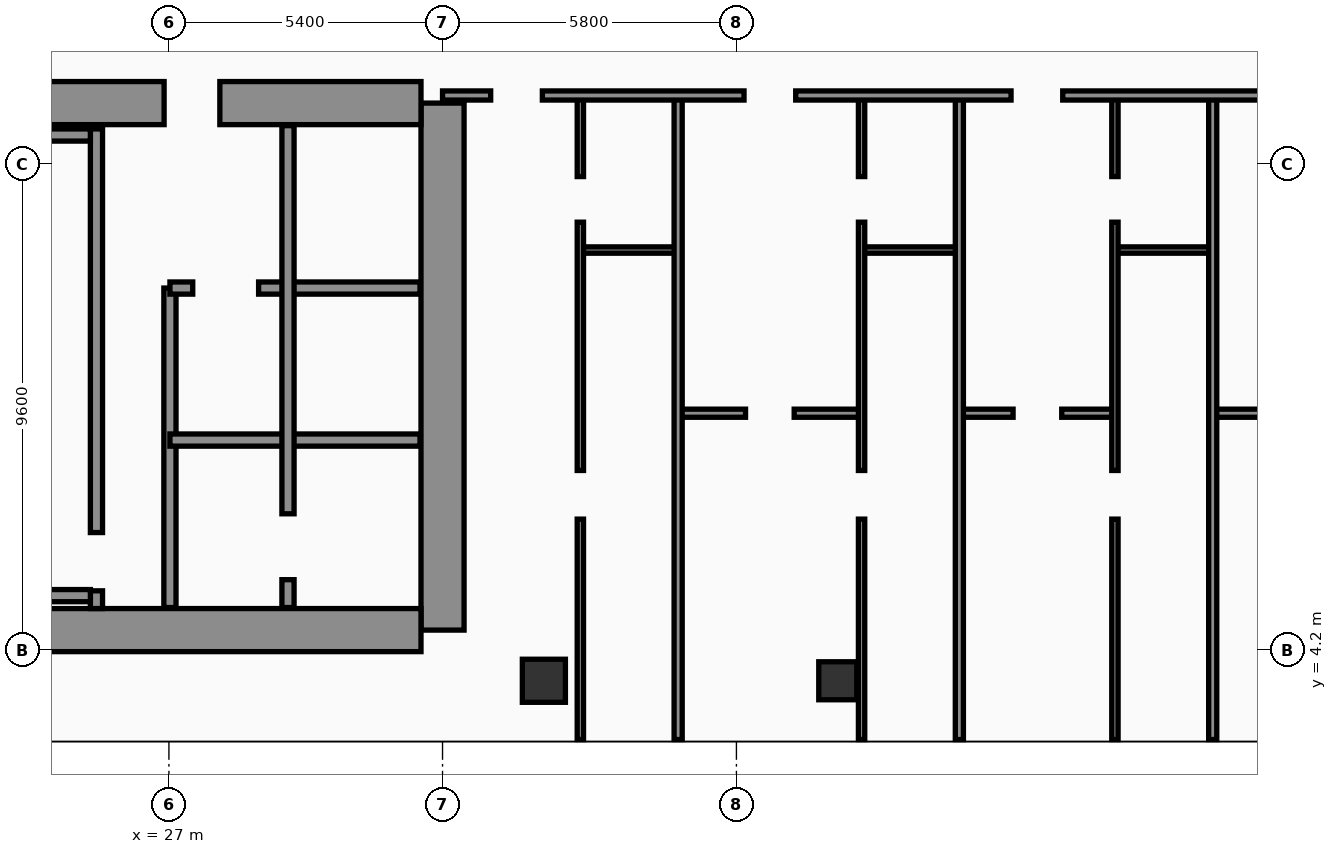
"""IFC4 building model, lengths in metres.
Left out: names, types, materials, properties, quantities, classifications, styles, units other than length and angle.
Written with IfcOpenShell. Run it as: python <this file> out.ifc"""

import sys

from ifc_helpers import new_model, si_unit, direction, frame, frame_2d, origin, origin_2d, place, context, subcontext, project, spatial, rectangle, hollow_rectangle, extrude, element, fill, save


model = new_model("IFC4")
c1 = context("Model", 3, precision=1e-05, world=origin(), true_north=direction((0.0, 1.0)))
c2 = subcontext(c1, "Body", "Model", "MODEL_VIEW")
j1 = project(units=[si_unit("LENGTHUNIT", "METRE"), si_unit("PLANEANGLEUNIT", "RADIAN")], contexts=[c1])
p1 = place(None, origin())
s1 = spatial("IfcSite", under=j1, at=p1, CompositionType="ELEMENT")
p2 = place(p1, origin())
s2 = spatial("IfcBuilding", under=s1, at=p2, CompositionType="ELEMENT")
p3 = place(p2, frame((0.0, 0.0, 171.3)))
s3 = spatial("IfcBuildingStorey", under=s2, at=p3, CompositionType="ELEMENT", Elevation=171.3)
p4 = place(p3, frame((32.4, 4.6, 0.0), z_axis=(0.0, 0.0, 1.0), x_axis=(0.0, 1.0, 0.0)))
e1 = element("IfcWall", 1, at=p4, inside=s3, PredefinedType="SHEAR", context=c2, shape_type="SweptSolid", body=[
    extrude(rectangle(XDim=10.4, YDim=0.85, at=frame_2d((5.2, 0.0))), origin(), (0.0, 0.0, 1.0), 3.56),
])
p5 = place(p3, frame((22.025, 15.0, 0.0), z_axis=(0.0, 0.0, 1.0), x_axis=(1.0, 0.0, 0.0)))
e2 = element("IfcWall", 2, at=p5, inside=s3, PredefinedType="SHEAR", context=c2, shape_type="SweptSolid", body=[
    extrude(rectangle(XDim=9.95, YDim=0.85, at=frame_2d((4.975, 0.0))), origin(), (0.0, 0.0, 1.0), 3.56),
])
p6 = place(p5, frame((4.88, 0.0, 0.0)))
e3 = element("IfcOpeningElement", 3, at=p6, cuts=e2, PredefinedType="OPENING", context=c2, shape_type="SweptSolid", body=[
    extrude(rectangle(XDim=1.1, YDim=2.2, at=frame_2d((0.55, 1.1))), frame((0.0, 0.435, 0.0), z_axis=(0.0, -1.0, 0.0), x_axis=(1.0, 0.0, 0.0)), (0.0, 0.0, 1.0), 0.87),
])
p7 = place(p3, frame((22.025, 4.6, 0.0), z_axis=(0.0, 0.0, 1.0), x_axis=(1.0, 0.0, 0.0)))
e4 = element("IfcWall", 4, at=p7, inside=s3, PredefinedType="SHEAR", context=c2, shape_type="SweptSolid", body=[
    extrude(rectangle(XDim=9.95, YDim=0.85, at=frame_2d((4.975, 0.0))), origin(), (0.0, 0.0, 1.0), 3.56),
])
p8 = place(p3, frame((25.57, 5.025, 0.0), z_axis=(0.0, 0.0, 1.0), x_axis=(0.0, 1.0, 0.0)))
e5 = element("IfcWall", 5, at=p8, inside=s3, PredefinedType="SOLIDWALL", context=c2, shape_type="SweptSolid", body=[
    extrude(rectangle(XDim=9.465, YDim=0.24, at=frame_2d((4.732, 0.0))), origin(), (0.0, 0.0, 1.0), 3.56),
])
p9 = place(p8, frame((0.35, 0.0, 0.0)))
e6 = element("IfcOpeningElement", 6, at=p9, cuts=e5, PredefinedType="OPENING", context=c2, shape_type="SweptSolid", body=[
    extrude(rectangle(XDim=1.15, YDim=2.2, at=frame_2d((0.575, 1.1))), frame((0.0, 0.13, 0.0), z_axis=(0.0, -1.0, 0.0), x_axis=(1.0, 0.0, 0.0)), (0.0, 0.0, 1.0), 0.26),
])
for number, where, z_axis, x_axis in (
    (7, (22.35, 5.28, 0.0), (0.0, 0.0, 1.0), (1.0, 0.0, 0.0)),
    (8, (22.35, 14.37, 0.0), (0.0, 0.0, 1.0), (1.0, 0.0, 0.0)),
):
    element("IfcWall", number, at=place(p3, frame(where, z_axis=z_axis, x_axis=x_axis)), inside=s3, PredefinedType="SOLIDWALL", context=c2, shape_type="SweptSolid", body=[
        extrude(rectangle(XDim=3.1, YDim=0.24, at=frame_2d((1.55, 0.0))), origin(), (0.0, 0.0, 1.0), 3.56),
    ])
p10 = place(p3, frame((34.4, 3.6, 0.0), z_axis=(0.0, 0.0, 1.0), x_axis=(1.0, 0.0, 0.0)))
e9 = element("IfcColumn", 9, at=p10, inside=s3, PredefinedType="COLUMN", context=c2, shape_type="SweptSolid", body=[
    extrude(hollow_rectangle(XDim=0.85, YDim=0.85, WallThickness=0.036, at=origin_2d()), origin(), (0.0, 0.0, 1.0), 3.56),
])
p11 = place(p3, frame((40.2, 3.6, 0.0), z_axis=(0.0, 0.0, 1.0), x_axis=(1.0, 0.0, 0.0)))
e10 = element("IfcColumn", 10, at=p11, inside=s3, PredefinedType="COLUMN", context=c2, shape_type="SweptSolid", body=[
    extrude(hollow_rectangle(XDim=0.75, YDim=0.75, WallThickness=0.032, at=origin_2d()), origin(), (0.0, 0.0, 1.0), 3.56),
])
p12 = place(p3, frame((27.02, 5.045, 0.0), z_axis=(0.0, 0.0, 1.0), x_axis=(0.0, 1.0, 0.0)))
e11 = element("IfcWall", 11, at=p12, inside=s3, PredefinedType="SOLIDWALL", context=c2, shape_type="SweptSolid", body=[
    extrude(rectangle(XDim=6.305, YDim=0.24, at=frame_2d((3.153, 0.0))), origin(), (0.0, 0.0, 1.0), 3.56),
])
p13 = place(p3, frame((27.02, 11.35, 0.0), z_axis=(0.0, 0.0, 1.0), x_axis=(1.0, 0.0, 0.0)))
e12 = element("IfcWall", 12, at=p13, inside=s3, PredefinedType="SOLIDWALL", context=c2, shape_type="SweptSolid", body=[
    extrude(rectangle(XDim=4.935, YDim=0.24, at=frame_2d((2.468, 0.0))), origin(), (0.0, 0.0, 1.0), 3.56),
])
p14 = place(p13, frame((0.45, 0.0, 0.0)))
e13 = element("IfcOpeningElement", 13, at=p14, cuts=e12, PredefinedType="OPENING", context=c2, shape_type="SweptSolid", body=[
    extrude(rectangle(XDim=1.3, YDim=2.35, at=frame_2d((0.65, 1.175))), frame((0.0, 0.13, 0.0), z_axis=(0.0, -1.0, 0.0), x_axis=(1.0, 0.0, 0.0)), (0.0, 0.0, 1.0), 0.26),
])
p15 = place(p3, frame((27.02, 8.35, 0.0), z_axis=(0.0, 0.0, 1.0), x_axis=(1.0, 0.0, 0.0)))
e14 = element("IfcWall", 14, at=p15, inside=s3, PredefinedType="SOLIDWALL", context=c2, shape_type="SweptSolid", body=[
    extrude(rectangle(XDim=4.935, YDim=0.24, at=frame_2d((2.468, 0.0))), origin(), (0.0, 0.0, 1.0), 3.56),
])
p16 = place(p3, frame((29.35, 5.045, 0.0), z_axis=(0.0, 0.0, 1.0), x_axis=(0.0, 1.0, 0.0)))
e15 = element("IfcWall", 15, at=p16, inside=s3, PredefinedType="SOLIDWALL", context=c2, shape_type="SweptSolid", body=[
    extrude(rectangle(XDim=9.51, YDim=0.24, at=frame_2d((4.755, 0.0))), origin(), (0.0, 0.0, 1.0), 3.56),
])
p17 = place(p16, frame((0.55, 0.0, 0.0)))
e16 = element("IfcOpeningElement", 16, at=p17, cuts=e15, PredefinedType="OPENING", context=c2, shape_type="SweptSolid", body=[
    extrude(rectangle(XDim=1.3, YDim=2.35, at=frame_2d((0.65, 1.175))), frame((0.0, 0.13, 0.0), z_axis=(0.0, -1.0, 0.0), x_axis=(1.0, 0.0, 0.0)), (0.0, 0.0, 1.0), 0.26),
])
p18 = place(p3, frame((35.12, 12.1, 0.0), z_axis=(0.0, 0.0, 1.0), x_axis=(1.0, 0.0, 0.0)))
e17 = element("IfcWall", 17, at=p18, inside=s3, PredefinedType="PARTITIONING", context=c2, shape_type="SweptSolid", body=[
    extrude(rectangle(XDim=1.93, YDim=0.125, at=frame_2d((0.965, 0.0))), origin(), (0.0, 0.0, 1.0), 3.56),
])
p19 = place(p3, frame((35.12, 2.44, 0.0), z_axis=(0.0, 0.0, 1.0), x_axis=(0.0, 1.0, 0.0)))
e18 = element("IfcWall", 18, at=p19, inside=s3, PredefinedType="PARTITIONING", context=c2, shape_type="SweptSolid", body=[
    extrude(rectangle(XDim=12.71, YDim=0.125, at=frame_2d((6.355, 0.0))), origin(), (0.0, 0.0, 1.0), 2.94),
])
p20 = place(p19, frame((4.35, 0.0, 0.0)))
e19 = element("IfcOpeningElement", 19, at=p20, cuts=e18, PredefinedType="OPENING", context=c2, shape_type="SweptSolid", body=[
    extrude(rectangle(XDim=0.96, YDim=2.2, at=frame_2d((0.48, 1.1))), frame((0.0, 0.073, 0.0), z_axis=(0.0, -1.0, 0.0), x_axis=(1.0, 0.0, 0.0)), (0.0, 0.0, 1.0), 0.145),
])
p21 = place(p19, frame((10.21, 0.0, 0.0)))
e20 = element("IfcOpeningElement", 20, at=p21, cuts=e18, PredefinedType="OPENING", context=c2, shape_type="SweptSolid", body=[
    extrude(rectangle(XDim=0.9, YDim=2.15, at=frame_2d((0.45, 1.075))), frame((0.0, 0.073, 0.0), z_axis=(0.0, -1.0, 0.0), x_axis=(1.0, 0.0, 0.0)), (0.0, 0.0, 1.0), 0.145),
])
p22 = place(p3, frame((40.67, 12.1, 0.0), z_axis=(0.0, 0.0, 1.0), x_axis=(1.0, 0.0, 0.0)))
e21 = element("IfcWall", 21, at=p22, inside=s3, PredefinedType="PARTITIONING", context=c2, shape_type="SweptSolid", body=[
    extrude(rectangle(XDim=1.93, YDim=0.125, at=frame_2d((0.965, 0.0))), origin(), (0.0, 0.0, 1.0), 3.56),
])
p23 = place(p3, frame((37.05, 8.88, 0.0), z_axis=(0.0, 0.0, 1.0), x_axis=(1.0, 0.0, 0.0)))
e22 = element("IfcWall", 22, at=p23, inside=s3, PredefinedType="PARTITIONING", context=c2, shape_type="SweptSolid", body=[
    extrude(rectangle(XDim=3.62, YDim=0.16, at=frame_2d((1.81, 0.0))), origin(), (0.0, 0.0, 1.0), 2.94),
])
p24 = place(p23, frame((1.33, 0.0, 0.0)))
e23 = element("IfcOpeningElement", 23, at=p24, cuts=e22, PredefinedType="OPENING", context=c2, shape_type="SweptSolid", body=[
    extrude(rectangle(XDim=0.96, YDim=2.2, at=frame_2d((0.48, 1.1))), frame((0.0, 0.09, 0.0), z_axis=(0.0, -1.0, 0.0), x_axis=(1.0, 0.0, 0.0)), (0.0, 0.0, 1.0), 0.18),
])
p25 = place(p3, frame((40.67, 2.44, 0.0), z_axis=(0.0, 0.0, 1.0), x_axis=(0.0, 1.0, 0.0)))
e24 = element("IfcWall", 24, at=p25, inside=s3, PredefinedType="PARTITIONING", context=c2, shape_type="SweptSolid", body=[
    extrude(rectangle(XDim=12.71, YDim=0.125, at=frame_2d((6.355, 0.0))), origin(), (0.0, 0.0, 1.0), 2.94),
])
p26 = place(p25, frame((4.35, 0.0, 0.0)))
e25 = element("IfcOpeningElement", 25, at=p26, cuts=e24, PredefinedType="OPENING", context=c2, shape_type="SweptSolid", body=[
    extrude(rectangle(XDim=0.96, YDim=2.2, at=frame_2d((0.48, 1.1))), frame((0.0, 0.073, 0.0), z_axis=(0.0, -1.0, 0.0), x_axis=(1.0, 0.0, 0.0)), (0.0, 0.0, 1.0), 0.145),
])
p27 = place(p25, frame((10.21, 0.0, 0.0)))
e26 = element("IfcOpeningElement", 26, at=p27, cuts=e24, PredefinedType="OPENING", context=c2, shape_type="SweptSolid", body=[
    extrude(rectangle(XDim=0.9, YDim=2.15, at=frame_2d((0.45, 1.075))), frame((0.0, 0.073, 0.0), z_axis=(0.0, -1.0, 0.0), x_axis=(1.0, 0.0, 0.0)), (0.0, 0.0, 1.0), 0.145),
])
p28 = place(p3, frame((37.05, 2.44, 0.0), z_axis=(0.0, 0.0, 1.0), x_axis=(0.0, 1.0, 0.0)))
e27 = element("IfcWall", 27, at=p28, inside=s3, PredefinedType="PARTITIONING", context=c2, shape_type="SweptSolid", body=[
    extrude(rectangle(XDim=12.71, YDim=0.16, at=frame_2d((6.355, 0.0))), origin(), (0.0, 0.0, 1.0), 2.94),
])
p29 = place(p3, frame((45.67, 12.1, 0.0), z_axis=(0.0, 0.0, 1.0), x_axis=(1.0, 0.0, 0.0)))
e28 = element("IfcWall", 28, at=p29, inside=s3, PredefinedType="PARTITIONING", context=c2, shape_type="SweptSolid", body=[
    extrude(rectangle(XDim=1.93, YDim=0.125, at=frame_2d((0.965, 0.0))), origin(), (0.0, 0.0, 1.0), 2.94),
])
p30 = place(p3, frame((42.6, 8.88, 0.0), z_axis=(0.0, 0.0, 1.0), x_axis=(1.0, 0.0, 0.0)))
e29 = element("IfcWall", 29, at=p30, inside=s3, PredefinedType="PARTITIONING", context=c2, shape_type="SweptSolid", body=[
    extrude(rectangle(XDim=3.07, YDim=0.16, at=frame_2d((1.535, 0.0))), origin(), (0.0, 0.0, 1.0), 3.56),
])
p31 = place(p30, frame((1.06, 0.0, 0.0)))
e30 = element("IfcOpeningElement", 30, at=p31, cuts=e29, PredefinedType="OPENING", context=c2, shape_type="SweptSolid", body=[
    extrude(rectangle(XDim=0.96, YDim=2.2, at=frame_2d((0.48, 1.1))), frame((0.0, 0.09, 0.0), z_axis=(0.0, -1.0, 0.0), x_axis=(1.0, 0.0, 0.0)), (0.0, 0.0, 1.0), 0.18),
])
p32 = place(p3, frame((45.67, 2.44, 0.0), z_axis=(0.0, 0.0, 1.0), x_axis=(0.0, 1.0, 0.0)))
e31 = element("IfcWall", 31, at=p32, inside=s3, PredefinedType="PARTITIONING", context=c2, shape_type="SweptSolid", body=[
    extrude(rectangle(XDim=12.71, YDim=0.125, at=frame_2d((6.355, 0.0))), origin(), (0.0, 0.0, 1.0), 3.04),
])
p33 = place(p32, frame((4.35, 0.0, 0.0)))
e32 = element("IfcOpeningElement", 32, at=p33, cuts=e31, PredefinedType="OPENING", context=c2, shape_type="SweptSolid", body=[
    extrude(rectangle(XDim=0.96, YDim=2.2, at=frame_2d((0.48, 1.1))), frame((0.0, 0.073, 0.0), z_axis=(0.0, -1.0, 0.0), x_axis=(1.0, 0.0, 0.0)), (0.0, 0.0, 1.0), 0.145),
])
p34 = place(p32, frame((10.21, 0.0, 0.0)))
e33 = element("IfcOpeningElement", 33, at=p34, cuts=e31, PredefinedType="OPENING", context=c2, shape_type="SweptSolid", body=[
    extrude(rectangle(XDim=0.9, YDim=2.15, at=frame_2d((0.45, 1.075))), frame((0.0, 0.073, 0.0), z_axis=(0.0, -1.0, 0.0), x_axis=(1.0, 0.0, 0.0)), (0.0, 0.0, 1.0), 0.145),
])
p35 = place(p3, frame((42.6, 2.44, 0.0), z_axis=(0.0, 0.0, 1.0), x_axis=(0.0, 1.0, 0.0)))
e34 = element("IfcWall", 34, at=p35, inside=s3, PredefinedType="PARTITIONING", context=c2, shape_type="SweptSolid", body=[
    extrude(rectangle(XDim=12.71, YDim=0.16, at=frame_2d((6.355, 0.0))), origin(), (0.0, 0.0, 1.0), 3.04),
])
p36 = place(p3, frame((47.6, 8.88, 0.0), z_axis=(0.0, 0.0, 1.0), x_axis=(1.0, 0.0, 0.0)))
e35 = element("IfcWall", 35, at=p36, inside=s3, PredefinedType="PARTITIONING", context=c2, shape_type="SweptSolid", body=[
    extrude(rectangle(XDim=3.07, YDim=0.16, at=frame_2d((1.535, 0.0))), origin(), (0.0, 0.0, 1.0), 2.94),
])
p37 = place(p36, frame((1.06, 0.0, 0.0)))
e36 = element("IfcOpeningElement", 36, at=p37, cuts=e35, PredefinedType="OPENING", context=c2, shape_type="SweptSolid", body=[
    extrude(rectangle(XDim=0.96, YDim=2.2, at=frame_2d((0.48, 1.1))), frame((0.0, 0.09, 0.0), z_axis=(0.0, -1.0, 0.0), x_axis=(1.0, 0.0, 0.0)), (0.0, 0.0, 1.0), 0.18),
])
p38 = place(p3, frame((47.6, 2.44, 0.0), z_axis=(0.0, 0.0, 1.0), x_axis=(0.0, 1.0, 0.0)))
e37 = element("IfcWall", 37, at=p38, inside=s3, PredefinedType="PARTITIONING", context=c2, shape_type="SweptSolid", body=[
    extrude(rectangle(XDim=12.71, YDim=0.16, at=frame_2d((6.355, 0.0))), origin(), (0.0, 0.0, 1.0), 2.94),
])
p39 = place(p3, frame((32.4, 15.15, 0.0), z_axis=(0.0, 0.0, 1.0), x_axis=(1.0, 0.0, 0.0)))
e38 = element("IfcWall", 38, at=p39, inside=s3, PredefinedType="PARTITIONING", context=c2, shape_type="SweptSolid", body=[
    extrude(rectangle(XDim=20.2, YDim=0.18, at=frame_2d((10.1, 0.0))), origin(), (0.0, 0.0, 1.0), 2.94),
])
p40 = place(p39, frame((0.95, 0.0, 0.0)))
e39 = element("IfcOpeningElement", 39, at=p40, cuts=e38, PredefinedType="OPENING", context=c2, shape_type="SweptSolid", body=[
    extrude(rectangle(XDim=1.02, YDim=2.2, at=frame_2d((0.51, 1.1))), frame((0.0, 0.1, 0.0), z_axis=(0.0, -1.0, 0.0), x_axis=(1.0, 0.0, 0.0)), (0.0, 0.0, 1.0), 0.2),
])
p41 = place(p39, frame((5.95, 0.0, 0.0)))
e40 = element("IfcOpeningElement", 40, at=p41, cuts=e38, PredefinedType="OPENING", context=c2, shape_type="SweptSolid", body=[
    extrude(rectangle(XDim=1.02, YDim=2.2, at=frame_2d((0.51, 1.1))), frame((0.0, 0.1, 0.0), z_axis=(0.0, -1.0, 0.0), x_axis=(1.0, 0.0, 0.0)), (0.0, 0.0, 1.0), 0.2),
])
p42 = place(p39, frame((11.22, 0.0, 0.0)))
e41 = element("IfcOpeningElement", 41, at=p42, cuts=e38, PredefinedType="OPENING", context=c2, shape_type="SweptSolid", body=[
    extrude(rectangle(XDim=1.02, YDim=2.2, at=frame_2d((0.51, 1.1))), frame((0.0, 0.1, 0.0), z_axis=(0.0, -1.0, 0.0), x_axis=(1.0, 0.0, 0.0)), (0.0, 0.0, 1.0), 0.2),
])
p43 = place(p39, frame((16.22, 0.0, 0.0)))
e42 = element("IfcOpeningElement", 42, at=p43, cuts=e38, PredefinedType="OPENING", context=c2, shape_type="SweptSolid", body=[
    extrude(rectangle(XDim=1.02, YDim=2.2, at=frame_2d((0.51, 1.1))), frame((0.0, 0.1, 0.0), z_axis=(0.0, -1.0, 0.0), x_axis=(1.0, 0.0, 0.0)), (0.0, 0.0, 1.0), 0.2),
])
p44 = place(p14, origin())
e43 = element("IfcDoor", 43, at=p44, inside=s3, OperationType="DOUBLE_DOOR_SLIDING", PredefinedType="DOOR", context=c2, shape_type="SweptSolid", body=[
    extrude(rectangle(XDim=1.3, YDim=2.35, at=frame_2d((0.65, 1.175))), frame((0.0, 0.025, 0.0), z_axis=(0.0, -1.0, 0.0), x_axis=(1.0, 0.0, 0.0)), (0.0, 0.0, 1.0), 0.05),
])
fill(e13, e43)
p45 = place(p17, origin())
e44 = element("IfcDoor", 44, at=p45, inside=s3, OperationType="DOUBLE_DOOR_SLIDING", PredefinedType="DOOR", context=c2, shape_type="SweptSolid", body=[
    extrude(rectangle(XDim=1.3, YDim=2.35, at=frame_2d((0.65, 1.175))), frame((0.0, 0.025, 0.0), z_axis=(0.0, -1.0, 0.0), x_axis=(1.0, 0.0, 0.0)), (0.0, 0.0, 1.0), 0.05),
])
fill(e16, e44)
p46 = place(p20, origin())
e45 = element("IfcDoor", 45, at=p46, inside=s3, OperationType="SINGLE_SWING_LEFT", PredefinedType="DOOR", context=c2, shape_type="SweptSolid", body=[
    extrude(rectangle(XDim=0.96, YDim=2.2, at=frame_2d((0.48, 1.1))), frame((0.0, 0.025, 0.0), z_axis=(0.0, -1.0, 0.0), x_axis=(1.0, 0.0, 0.0)), (0.0, 0.0, 1.0), 0.05),
])
fill(e19, e45)
p47 = place(p21, origin())
e46 = element("IfcDoor", 46, at=p47, inside=s3, OperationType="SINGLE_SWING_RIGHT", PredefinedType="DOOR", context=c2, shape_type="SweptSolid", body=[
    extrude(rectangle(XDim=0.9, YDim=2.15, at=frame_2d((0.45, 1.075))), frame((0.0, 0.025, 0.0), z_axis=(0.0, -1.0, 0.0), x_axis=(1.0, 0.0, 0.0)), (0.0, 0.0, 1.0), 0.05),
])
fill(e20, e46)
p48 = place(p24, origin())
e47 = element("IfcDoor", 47, at=p48, inside=s3, OperationType="SINGLE_SWING_LEFT", PredefinedType="DOOR", context=c2, shape_type="SweptSolid", body=[
    extrude(rectangle(XDim=0.96, YDim=2.2, at=frame_2d((0.48, 1.1))), frame((0.0, 0.025, 0.0), z_axis=(0.0, -1.0, 0.0), x_axis=(1.0, 0.0, 0.0)), (0.0, 0.0, 1.0), 0.05),
])
fill(e23, e47)
p49 = place(p26, origin())
e48 = element("IfcDoor", 48, at=p49, inside=s3, OperationType="SINGLE_SWING_LEFT", PredefinedType="DOOR", context=c2, shape_type="SweptSolid", body=[
    extrude(rectangle(XDim=0.96, YDim=2.2, at=frame_2d((0.48, 1.1))), frame((0.0, 0.025, 0.0), z_axis=(0.0, -1.0, 0.0), x_axis=(1.0, 0.0, 0.0)), (0.0, 0.0, 1.0), 0.05),
])
fill(e25, e48)
p50 = place(p27, origin())
e49 = element("IfcDoor", 49, at=p50, inside=s3, OperationType="SINGLE_SWING_RIGHT", PredefinedType="DOOR", context=c2, shape_type="SweptSolid", body=[
    extrude(rectangle(XDim=0.9, YDim=2.15, at=frame_2d((0.45, 1.075))), frame((0.0, 0.025, 0.0), z_axis=(0.0, -1.0, 0.0), x_axis=(1.0, 0.0, 0.0)), (0.0, 0.0, 1.0), 0.05),
])
fill(e26, e49)
p51 = place(p31, origin())
e50 = element("IfcDoor", 50, at=p51, inside=s3, OperationType="SINGLE_SWING_LEFT", PredefinedType="DOOR", context=c2, shape_type="SweptSolid", body=[
    extrude(rectangle(XDim=0.96, YDim=2.2, at=frame_2d((0.48, 1.1))), frame((0.0, 0.025, 0.0), z_axis=(0.0, -1.0, 0.0), x_axis=(1.0, 0.0, 0.0)), (0.0, 0.0, 1.0), 0.05),
])
fill(e30, e50)
p52 = place(p33, origin())
e51 = element("IfcDoor", 51, at=p52, inside=s3, OperationType="SINGLE_SWING_LEFT", PredefinedType="DOOR", context=c2, shape_type="SweptSolid", body=[
    extrude(rectangle(XDim=0.96, YDim=2.2, at=frame_2d((0.48, 1.1))), frame((0.0, 0.025, 0.0), z_axis=(0.0, -1.0, 0.0), x_axis=(1.0, 0.0, 0.0)), (0.0, 0.0, 1.0), 0.05),
])
fill(e32, e51)
p53 = place(p34, origin())
e52 = element("IfcDoor", 52, at=p53, inside=s3, OperationType="SINGLE_SWING_RIGHT", PredefinedType="DOOR", context=c2, shape_type="SweptSolid", body=[
    extrude(rectangle(XDim=0.9, YDim=2.15, at=frame_2d((0.45, 1.075))), frame((0.0, 0.025, 0.0), z_axis=(0.0, -1.0, 0.0), x_axis=(1.0, 0.0, 0.0)), (0.0, 0.0, 1.0), 0.05),
])
fill(e33, e52)
p54 = place(p40, origin())
e53 = element("IfcDoor", 53, at=p54, inside=s3, OperationType="SINGLE_SWING_LEFT", PredefinedType="DOOR", context=c2, shape_type="SweptSolid", body=[
    extrude(rectangle(XDim=1.02, YDim=2.2, at=frame_2d((0.51, 1.1))), frame((0.0, 0.025, 0.0), z_axis=(0.0, -1.0, 0.0), x_axis=(1.0, 0.0, 0.0)), (0.0, 0.0, 1.0), 0.05),
])
fill(e39, e53)
p55 = place(p41, origin())
e54 = element("IfcDoor", 54, at=p55, inside=s3, OperationType="SINGLE_SWING_RIGHT", PredefinedType="DOOR", context=c2, shape_type="SweptSolid", body=[
    extrude(rectangle(XDim=1.02, YDim=2.2, at=frame_2d((0.51, 1.1))), frame((0.0, 0.025, 0.0), z_axis=(0.0, -1.0, 0.0), x_axis=(1.0, 0.0, 0.0)), (0.0, 0.0, 1.0), 0.05),
])
fill(e40, e54)
p56 = place(p42, origin())
e55 = element("IfcDoor", 55, at=p56, inside=s3, OperationType="SINGLE_SWING_LEFT", PredefinedType="DOOR", context=c2, shape_type="SweptSolid", body=[
    extrude(rectangle(XDim=1.02, YDim=2.2, at=frame_2d((0.51, 1.1))), frame((0.0, 0.025, 0.0), z_axis=(0.0, -1.0, 0.0), x_axis=(1.0, 0.0, 0.0)), (0.0, 0.0, 1.0), 0.05),
])
fill(e41, e55)
p57 = place(p9, origin())
e56 = element("IfcDoor", 56, at=p57, inside=s3, OperationType="SINGLE_SWING_RIGHT", PredefinedType="DOOR", context=c2, shape_type="SweptSolid", body=[
    extrude(rectangle(XDim=1.15, YDim=2.2, at=frame_2d((0.575, 1.1))), frame((0.0, 0.025, 0.0), z_axis=(0.0, -1.0, 0.0), x_axis=(1.0, 0.0, 0.0)), (0.0, 0.0, 1.0), 0.05),
])
fill(e6, e56)
p58 = place(p6, origin())
e57 = element("IfcDoor", 57, at=p58, inside=s3, OperationType="SINGLE_SWING_RIGHT", PredefinedType="DOOR", context=c2, shape_type="SweptSolid", body=[
    extrude(rectangle(XDim=1.1, YDim=2.2, at=frame_2d((0.55, 1.1))), frame((0.0, 0.025, 0.0), z_axis=(0.0, -1.0, 0.0), x_axis=(1.0, 0.0, 0.0)), (0.0, 0.0, 1.0), 0.05),
])
fill(e3, e57)
save(model, sys.argv[1])
